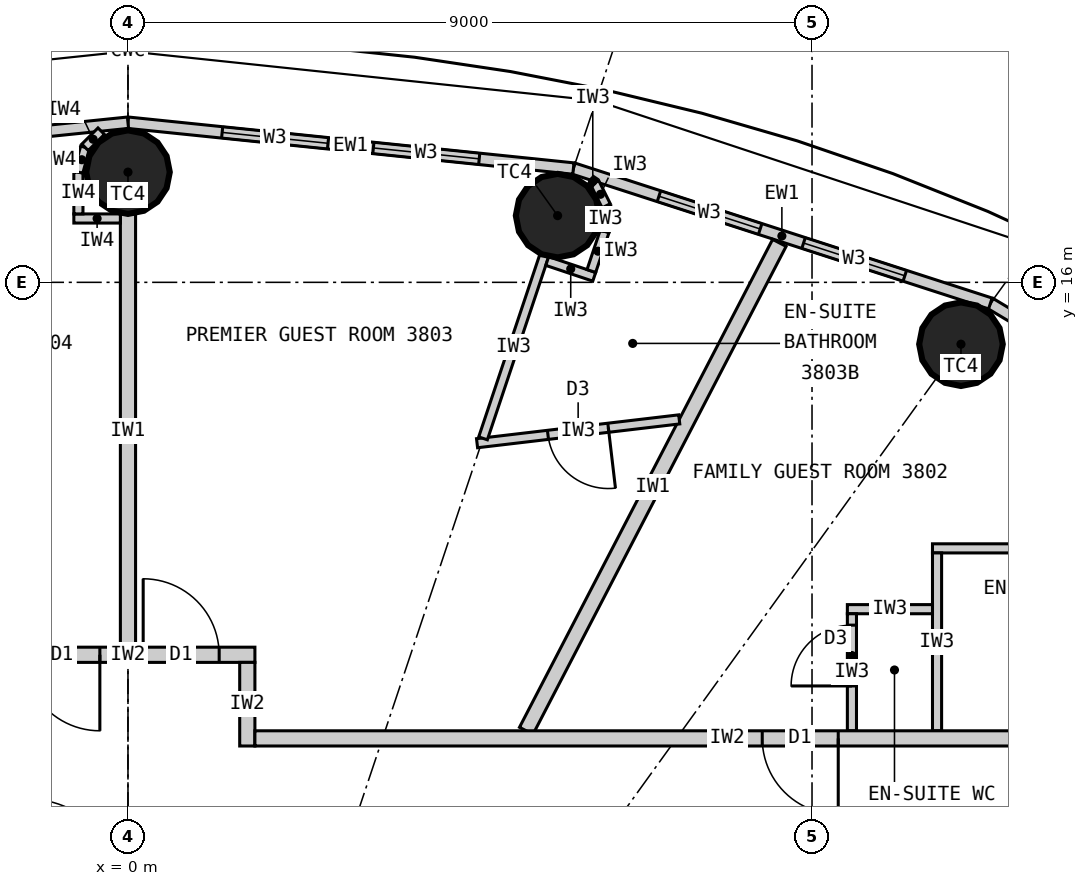
"""IFC4 building model, lengths in metres.
Left out: names, types, materials, properties, quantities, classifications, styles, units other than length and angle.
Written with IfcOpenShell. Run it as: python <this file> out.ifc"""

import sys

from ifc_helpers import new_model, si_unit, direction, frame, frame_2d, origin, origin_2d, place, context, subcontext, project, spatial, rectangle, circle, extrude, element, fill, save


model = new_model("IFC4")
c1 = context("Model", 3, precision=1e-05, world=origin(), true_north=direction((0.0, 1.0)))
c2 = subcontext(c1, "Body", "Model", "MODEL_VIEW")
j1 = project(units=[si_unit("LENGTHUNIT", "METRE"), si_unit("PLANEANGLEUNIT", "RADIAN")], contexts=[c1])
p1 = place(None, origin())
s1 = spatial("IfcSite", under=j1, at=p1, CompositionType="ELEMENT")
p2 = place(p1, origin())
s2 = spatial("IfcBuilding", under=s1, at=p2, CompositionType="ELEMENT")
p3 = place(p2, frame((0.0, 0.0, 146.7)))
s3 = spatial("IfcBuildingStorey", under=s2, at=p3, CompositionType="ELEMENT", Elevation=146.7)
for number, where, z_axis, x_axis in (
    (1, (10.96, 15.186, 0.0), (0.0, 0.0, 1.0), (1.0, 0.0, 0.0)),
    (2, (5.653, 16.877, 0.0), (0.0, 0.0, 1.0), (1.0, 0.0, 0.0)),
    (3, (0.0, 17.45, 0.0), (0.0, 0.0, 1.0), (1.0, 0.0, 0.0)),
):
    element("IfcColumn", number, at=place(p3, frame(where, z_axis=z_axis, x_axis=x_axis)), inside=s3, PredefinedType="COLUMN", context=c2, shape_type="SweptSolid", body=[
        extrude(circle(Radius=0.55, at=origin_2d()), origin(), (0.0, 0.0, 1.0), 3.3),
    ])
p4 = place(p3, frame((16.095, 12.876, 0.0), z_axis=(0.0, 0.0, 1.0), x_axis=(-0.857695199231, 0.514158482587, 0.0)))
e4 = element("IfcWall", 4, at=p4, inside=s3, PredefinedType="ELEMENTEDWALL", context=c2, shape_type="SweptSolid", body=[
    extrude(rectangle(XDim=5.536, YDim=0.15, at=frame_2d((2.768, 0.0))), origin(), (0.0, 0.0, 1.0), 3.12),
])
p5 = place(p4, frame((1.068, 0.0, 0.9)))
e5 = element("IfcOpeningElement", 5, at=p5, cuts=e4, PredefinedType="OPENING", context=c2, shape_type="SweptSolid", body=[
    extrude(rectangle(XDim=1.4, YDim=1.9, at=frame_2d((0.7, 0.95))), frame((0.0, 0.085, 0.0), z_axis=(0.0, -1.0, 0.0), x_axis=(1.0, 0.0, 0.0)), (0.0, 0.0, 1.0), 0.17),
])
p6 = place(p4, frame((3.068, 0.0, 0.9)))
e6 = element("IfcOpeningElement", 6, at=p6, cuts=e4, PredefinedType="OPENING", context=c2, shape_type="SweptSolid", body=[
    extrude(rectangle(XDim=1.4, YDim=1.9, at=frame_2d((0.7, 0.95))), frame((0.0, 0.085, 0.0), z_axis=(0.0, -1.0, 0.0), x_axis=(1.0, 0.0, 0.0)), (0.0, 0.0, 1.0), 0.17),
])
p7 = place(p3, frame((11.346, 15.722, 0.0), z_axis=(0.0, 0.0, 1.0), x_axis=(-0.951432482129, 0.307857486429, 0.0)))
e7 = element("IfcWall", 7, at=p7, inside=s3, PredefinedType="ELEMENTEDWALL", context=c2, shape_type="SweptSolid", body=[
    extrude(rectangle(XDim=5.766, YDim=0.15, at=frame_2d((2.883, 0.0))), origin(), (0.0, 0.0, 1.0), 3.12),
])
p8 = place(p7, frame((1.183, 0.0, 0.9)))
e8 = element("IfcOpeningElement", 8, at=p8, cuts=e7, PredefinedType="OPENING", context=c2, shape_type="SweptSolid", body=[
    extrude(rectangle(XDim=1.4, YDim=1.9, at=frame_2d((0.7, 0.95))), frame((0.0, 0.085, 0.0), z_axis=(0.0, -1.0, 0.0), x_axis=(1.0, 0.0, 0.0)), (0.0, 0.0, 1.0), 0.17),
])
p9 = place(p7, frame((3.183, 0.0, 0.9)))
e9 = element("IfcOpeningElement", 9, at=p9, cuts=e7, PredefinedType="OPENING", context=c2, shape_type="SweptSolid", body=[
    extrude(rectangle(XDim=1.4, YDim=1.9, at=frame_2d((0.7, 0.95))), frame((0.0, 0.085, 0.0), z_axis=(0.0, -1.0, 0.0), x_axis=(1.0, 0.0, 0.0)), (0.0, 0.0, 1.0), 0.17),
])
p10 = place(p3, frame((5.86, 17.497, 0.0), z_axis=(0.0, 0.0, 1.0), x_axis=(-0.994751738032, 0.102318032045, 0.0)))
e10 = element("IfcWall", 10, at=p10, inside=s3, PredefinedType="ELEMENTEDWALL", context=c2, shape_type="SweptSolid", body=[
    extrude(rectangle(XDim=5.891, YDim=0.15, at=frame_2d((2.946, 0.0))), origin(), (0.0, 0.0, 1.0), 3.12),
])
p11 = place(p10, frame((1.246, 0.0, 0.9)))
e11 = element("IfcOpeningElement", 11, at=p11, cuts=e10, PredefinedType="OPENING", context=c2, shape_type="SweptSolid", body=[
    extrude(rectangle(XDim=1.4, YDim=1.9, at=frame_2d((0.7, 0.95))), frame((0.0, 0.085, 0.0), z_axis=(0.0, -1.0, 0.0), x_axis=(1.0, 0.0, 0.0)), (0.0, 0.0, 1.0), 0.17),
])
p12 = place(p10, frame((3.246, 0.0, 0.9)))
e12 = element("IfcOpeningElement", 12, at=p12, cuts=e10, PredefinedType="OPENING", context=c2, shape_type="SweptSolid", body=[
    extrude(rectangle(XDim=1.4, YDim=1.9, at=frame_2d((0.7, 0.95))), frame((0.0, 0.085, 0.0), z_axis=(0.0, -1.0, 0.0), x_axis=(1.0, 0.0, 0.0)), (0.0, 0.0, 1.0), 0.17),
])
p13 = place(p3, frame((0.0, 18.1, 0.0), z_axis=(0.0, 0.0, 1.0), x_axis=(-0.994751738032, -0.102318032045, 0.0)))
e13 = element("IfcWall", 13, at=p13, inside=s3, PredefinedType="ELEMENTEDWALL", context=c2, shape_type="SweptSolid", body=[
    extrude(rectangle(XDim=5.891, YDim=0.15, at=frame_2d((2.946, 0.0))), origin(), (0.0, 0.0, 1.0), 3.12),
])
p14 = place(p13, frame((1.246, 0.0, 0.9)))
e14 = element("IfcOpeningElement", 14, at=p14, cuts=e13, PredefinedType="OPENING", context=c2, shape_type="SweptSolid", body=[
    extrude(rectangle(XDim=1.4, YDim=1.9, at=frame_2d((0.7, 0.95))), frame((0.0, 0.085, 0.0), z_axis=(0.0, -1.0, 0.0), x_axis=(1.0, 0.0, 0.0)), (0.0, 0.0, 1.0), 0.17),
])
p15 = place(p13, frame((3.246, 0.0, 0.9)))
e15 = element("IfcOpeningElement", 15, at=p15, cuts=e13, PredefinedType="OPENING", context=c2, shape_type="SweptSolid", body=[
    extrude(rectangle(XDim=1.4, YDim=1.9, at=frame_2d((0.7, 0.95))), frame((0.0, 0.085, 0.0), z_axis=(0.0, -1.0, 0.0), x_axis=(1.0, 0.0, 0.0)), (0.0, 0.0, 1.0), 0.17),
])
p16 = place(p3, frame((5.24, 10.1, 0.0), z_axis=(0.0, 0.0, 1.0), x_axis=(0.460532965373, 0.887642601391, 0.0)))
e16 = element("IfcWall", 16, at=p16, inside=s3, PredefinedType="PARTITIONING", context=c2, shape_type="SweptSolid", body=[
    extrude(rectangle(XDim=7.231, YDim=0.2, at=frame_2d((3.616, 0.0))), origin(), (0.0, 0.0, 1.0), 3.12),
])
p17 = place(p3, frame((0.0, 11.2, 0.0), z_axis=(0.0, 0.0, 1.0), x_axis=(0.0, 1.0, 0.0)))
e17 = element("IfcWall", 17, at=p17, inside=s3, PredefinedType="PARTITIONING", context=c2, shape_type="SweptSolid", body=[
    extrude(rectangle(XDim=5.7, YDim=0.2, at=frame_2d((2.85, 0.0))), origin(), (0.0, 0.0, 1.0), 2.42),
])
p18 = place(p3, frame((-1.67, 11.1, 0.0), z_axis=(0.0, 0.0, 1.0), x_axis=(1.0, 0.0, 0.0)))
e18 = element("IfcWall", 18, at=p18, inside=s3, PredefinedType="PARTITIONING", context=c2, shape_type="SweptSolid", body=[
    extrude(rectangle(XDim=3.34, YDim=0.2, at=frame_2d((1.67, 0.0))), origin(), (0.0, 0.0, 1.0), 3.12),
])
p19 = place(p18, frame((1.87, 0.0, 0.0)))
e19 = element("IfcOpeningElement", 19, at=p19, cuts=e18, PredefinedType="OPENING", context=c2, shape_type="SweptSolid", body=[
    extrude(rectangle(XDim=1.0, YDim=2.2, at=frame_2d((0.5, 1.1))), frame((0.0, 0.11, 0.0), z_axis=(0.0, -1.0, 0.0), x_axis=(1.0, 0.0, 0.0)), (0.0, 0.0, 1.0), 0.22),
])
p20 = place(p18, frame((0.3, 0.0, 0.0)))
e20 = element("IfcOpeningElement", 20, at=p20, cuts=e18, PredefinedType="OPENING", context=c2, shape_type="SweptSolid", body=[
    extrude(rectangle(XDim=1.0, YDim=2.2, at=frame_2d((0.5, 1.1))), frame((0.0, 0.11, 0.0), z_axis=(0.0, -1.0, 0.0), x_axis=(1.0, 0.0, 0.0)), (0.0, 0.0, 1.0), 0.22),
])
p21 = place(p3, frame((1.57, 9.9, 0.0), z_axis=(0.0, 0.0, 1.0), x_axis=(0.0, 1.0, 0.0)))
e21 = element("IfcWall", 21, at=p21, inside=s3, PredefinedType="PARTITIONING", context=c2, shape_type="SweptSolid", body=[
    extrude(rectangle(XDim=1.1, YDim=0.2, at=frame_2d((0.55, 0.0))), origin(), (0.0, 0.0, 1.0), 3.12),
])
p22 = place(p3, frame((15.525, 12.5, 0.0), z_axis=(0.0, 0.0, 1.0), x_axis=(-1.0, 0.0, 0.0)))
e22 = element("IfcWall", 22, at=p22, inside=s3, PredefinedType="PARTITIONING", context=c2, shape_type="SweptSolid", body=[
    extrude(rectangle(XDim=4.94, YDim=0.12, at=frame_2d((2.47, 0.0))), origin(), (0.0, 0.0, 1.0), 3.12),
])
p23 = place(p22, frame((2.07, 0.0, 0.0)))
e23 = element("IfcOpeningElement", 23, at=p23, cuts=e22, PredefinedType="OPENING", context=c2, shape_type="SweptSolid", body=[
    extrude(rectangle(XDim=0.8, YDim=2.1, at=frame_2d((0.4, 1.05))), frame((0.0, 0.07, 0.0), z_axis=(0.0, -1.0, 0.0), x_axis=(1.0, 0.0, 0.0)), (0.0, 0.0, 1.0), 0.14),
])
p24 = place(p3, frame((10.645, 10.1, 0.0), z_axis=(0.0, 0.0, 1.0), x_axis=(0.0, 1.0, 0.0)))
e24 = element("IfcWall", 24, at=p24, inside=s3, PredefinedType="PARTITIONING", context=c2, shape_type="SweptSolid", body=[
    extrude(rectangle(XDim=2.34, YDim=0.12, at=frame_2d((1.17, 0.0))), origin(), (0.0, 0.0, 1.0), 3.12),
])
p25 = place(p3, frame((10.585, 11.7, 0.0), z_axis=(0.0, 0.0, 1.0), x_axis=(-1.0, 0.0, 0.0)))
e25 = element("IfcWall", 25, at=p25, inside=s3, PredefinedType="PARTITIONING", context=c2, shape_type="SweptSolid", body=[
    extrude(rectangle(XDim=1.12, YDim=0.12, at=frame_2d((0.56, 0.0))), origin(), (0.0, 0.0, 1.0), 3.12),
])
p26 = place(p3, frame((9.525, 10.1, 0.0), z_axis=(0.0, 0.0, 1.0), x_axis=(0.0, 1.0, 0.0)))
e26 = element("IfcWall", 26, at=p26, inside=s3, PredefinedType="PARTITIONING", context=c2, shape_type="SweptSolid", body=[
    extrude(rectangle(XDim=1.54, YDim=0.12, at=frame_2d((0.77, 0.0))), origin(), (0.0, 0.0, 1.0), 3.12),
])
p27 = place(p26, frame((0.59, 0.0, 0.0)))
e27 = element("IfcOpeningElement", 27, at=p27, cuts=e26, PredefinedType="OPENING", context=c2, shape_type="SweptSolid", body=[
    extrude(rectangle(XDim=0.8, YDim=2.1, at=frame_2d((0.4, 1.05))), frame((0.0, 0.07, 0.0), z_axis=(0.0, -1.0, 0.0), x_axis=(1.0, 0.0, 0.0)), (0.0, 0.0, 1.0), 0.14),
])
p28 = place(p3, frame((7.253, 14.197, 0.0), z_axis=(0.0, 0.0, 1.0), x_axis=(-0.993128188393, -0.117031625725, 0.0)))
e28 = element("IfcWall", 28, at=p28, inside=s3, PredefinedType="PARTITIONING", context=c2, shape_type="SweptSolid", body=[
    extrude(rectangle(XDim=2.678, YDim=0.12, at=frame_2d((1.339, 0.0))), origin(), (0.0, 0.0, 1.0), 3.12),
])
p29 = place(p28, frame((0.939, 0.0, 0.0)))
e29 = element("IfcOpeningElement", 29, at=p29, cuts=e28, PredefinedType="OPENING", context=c2, shape_type="SweptSolid", body=[
    extrude(rectangle(XDim=0.8, YDim=2.1, at=frame_2d((0.4, 1.05))), frame((0.0, 0.07, 0.0), z_axis=(0.0, -1.0, 0.0), x_axis=(1.0, 0.0, 0.0)), (0.0, 0.0, 1.0), 0.14),
])
p30 = place(p3, frame((4.671, 13.948, 0.0), z_axis=(0.0, 0.0, 1.0), x_axis=(0.317669167093, 0.948201613729, 0.0)))
e30 = element("IfcWall", 30, at=p30, inside=s3, PredefinedType="PARTITIONING", context=c2, shape_type="SweptSolid", body=[
    extrude(rectangle(XDim=2.54, YDim=0.12, at=frame_2d((1.27, 0.0))), origin(), (0.0, 0.0, 1.0), 2.42),
])
p31 = place(p3, frame((5.516, 16.28, 0.0), z_axis=(0.0, 0.0, 1.0), x_axis=(0.948157944392, -0.317799484717, 0.0)))
e31 = element("IfcWall", 31, at=p31, inside=s3, PredefinedType="PARTITIONING", context=c2, shape_type="SweptSolid", body=[
    extrude(rectangle(XDim=0.652, YDim=0.12, at=frame_2d((0.326, 0.0))), origin(), (0.0, 0.0, 1.0), 3.12),
])
p32 = place(p3, frame((6.097, 16.149, 0.0), z_axis=(0.0, 0.0, 1.0), x_axis=(0.317292604854, 0.948327687514, 0.0)))
e32 = element("IfcWall", 32, at=p32, inside=s3, PredefinedType="PARTITIONING", context=c2, shape_type="SweptSolid", body=[
    extrude(rectangle(XDim=0.55, YDim=0.12, at=frame_2d((0.275, 0.0))), origin(), (0.0, 0.0, 1.0), 3.12),
])
for number, where, z_axis, x_axis in (
    (33, (6.271, 16.67, 0.0), (0.0, 0.0, 1.0), (0.061, 0.998, 0.0)),
    (34, (6.292, 17.007, 0.0), (0.0, 0.0, 1.0), (-0.445, 0.895, 0.0)),
):
    element("IfcWall", number, at=place(p3, frame(where, z_axis=z_axis, x_axis=x_axis)), inside=s3, PredefinedType="PARTITIONING", context=c2, shape_type="SweptSolid", body=[
        extrude(rectangle(XDim=0.338, YDim=0.12, at=frame_2d((0.169, 0.0))), origin(), (0.0, 0.0, 1.0), 3.12),
    ])
p33 = place(p3, frame((6.142, 17.31, 0.0), z_axis=(0.0, 0.0, 1.0), x_axis=(-0.835039693181, 0.550189704386, 0.0)))
e35 = element("IfcWall", 35, at=p33, inside=s3, PredefinedType="PARTITIONING", context=c2, shape_type="SweptSolid", body=[
    extrude(rectangle(XDim=0.062, YDim=0.12, at=frame_2d((0.031, 0.0))), origin(), (0.0, 0.0, 1.0), 3.12),
])
p34 = place(p3, frame((1.67, 10.0, 0.0), z_axis=(0.0, 0.0, 1.0), x_axis=(1.0, 0.0, 0.0)))
e36 = element("IfcWall", 36, at=p34, inside=s3, PredefinedType="PARTITIONING", context=c2, shape_type="SweptSolid", body=[
    extrude(rectangle(XDim=12.43, YDim=0.2, at=frame_2d((6.215, 0.0))), origin(), (0.0, 0.0, 1.0), 3.12),
])
p35 = place(p34, frame((6.675, 0.0, 0.0)))
e37 = element("IfcOpeningElement", 37, at=p35, cuts=e36, PredefinedType="OPENING", context=c2, shape_type="SweptSolid", body=[
    extrude(rectangle(XDim=1.0, YDim=2.2, at=frame_2d((0.5, 1.1))), frame((0.0, 0.11, 0.0), z_axis=(0.0, -1.0, 0.0), x_axis=(1.0, 0.0, 0.0)), (0.0, 0.0, 1.0), 0.22),
])
p36 = place(p3, frame((-0.1, 16.84, 0.0), z_axis=(0.0, 0.0, 1.0), x_axis=(-1.0, 0.0, 0.0)))
e38 = element("IfcWall", 38, at=p36, inside=s3, PredefinedType="PARTITIONING", context=c2, shape_type="SweptSolid", body=[
    extrude(rectangle(XDim=0.612, YDim=0.12, at=frame_2d((0.306, 0.0))), origin(), (0.0, 0.0, 1.0), 3.12),
])
p37 = place(p3, frame((-0.652, 16.9, 0.0), z_axis=(0.0, 0.0, 1.0), x_axis=(0.0, 1.0, 0.0)))
e39 = element("IfcWall", 39, at=p37, inside=s3, PredefinedType="PARTITIONING", context=c2, shape_type="SweptSolid", body=[
    extrude(rectangle(XDim=0.55, YDim=0.12, at=frame_2d((0.275, 0.0))), origin(), (0.0, 0.0, 1.0), 3.12),
])
p38 = place(p3, frame((-0.652, 17.45, 0.0), z_axis=(0.0, 0.0, 1.0), x_axis=(0.258832454679, 0.965922233104, 0.0)))
e40 = element("IfcWall", 40, at=p38, inside=s3, PredefinedType="PARTITIONING", context=c2, shape_type="SweptSolid", body=[
    extrude(rectangle(XDim=0.338, YDim=0.12, at=frame_2d((0.169, 0.0))), origin(), (0.0, 0.0, 1.0), 3.12),
])
p39 = place(p3, frame((-0.565, 17.776, 0.0), z_axis=(0.0, 0.0, 1.0), x_axis=(0.707106781187, 0.707106781187, 0.0)))
e41 = element("IfcWall", 41, at=p39, inside=s3, PredefinedType="PARTITIONING", context=c2, shape_type="SweptSolid", body=[
    extrude(rectangle(XDim=0.301, YDim=0.12, at=frame_2d((0.15, 0.0))), origin(), (0.0, 0.0, 1.0), 3.12),
])
p40 = place(p8, origin())
e42 = element("IfcWindow", 42, at=p40, inside=s3, PartitioningType="SINGLE_PANEL", PredefinedType="WINDOW", context=c2, shape_type="SweptSolid", body=[
    extrude(rectangle(XDim=1.4, YDim=1.9, at=frame_2d((0.7, 0.95))), frame((0.0, 0.03, 0.0), z_axis=(0.0, -1.0, 0.0), x_axis=(1.0, 0.0, 0.0)), (0.0, 0.0, 1.0), 0.06),
])
fill(e8, e42)
p41 = place(p9, origin())
e43 = element("IfcWindow", 43, at=p41, inside=s3, PartitioningType="SINGLE_PANEL", PredefinedType="WINDOW", context=c2, shape_type="SweptSolid", body=[
    extrude(rectangle(XDim=1.4, YDim=1.9, at=frame_2d((0.7, 0.95))), frame((0.0, 0.03, 0.0), z_axis=(0.0, -1.0, 0.0), x_axis=(1.0, 0.0, 0.0)), (0.0, 0.0, 1.0), 0.06),
])
fill(e9, e43)
p42 = place(p11, origin())
e44 = element("IfcWindow", 44, at=p42, inside=s3, PartitioningType="SINGLE_PANEL", PredefinedType="WINDOW", context=c2, shape_type="SweptSolid", body=[
    extrude(rectangle(XDim=1.4, YDim=1.9, at=frame_2d((0.7, 0.95))), frame((0.0, 0.03, 0.0), z_axis=(0.0, -1.0, 0.0), x_axis=(1.0, 0.0, 0.0)), (0.0, 0.0, 1.0), 0.06),
])
fill(e11, e44)
p43 = place(p12, origin())
e45 = element("IfcWindow", 45, at=p43, inside=s3, PartitioningType="SINGLE_PANEL", PredefinedType="WINDOW", context=c2, shape_type="SweptSolid", body=[
    extrude(rectangle(XDim=1.4, YDim=1.9, at=frame_2d((0.7, 0.95))), frame((0.0, 0.03, 0.0), z_axis=(0.0, -1.0, 0.0), x_axis=(1.0, 0.0, 0.0)), (0.0, 0.0, 1.0), 0.06),
])
fill(e12, e45)
p44 = place(p27, origin())
e46 = element("IfcDoor", 46, at=p44, inside=s3, OperationType="SINGLE_SWING_LEFT", PredefinedType="DOOR", context=c2, shape_type="SweptSolid", body=[
    extrude(rectangle(XDim=0.8, YDim=2.1, at=frame_2d((0.4, 1.05))), frame((0.0, 0.025, 0.0), z_axis=(0.0, -1.0, 0.0), x_axis=(1.0, 0.0, 0.0)), (0.0, 0.0, 1.0), 0.05),
])
fill(e27, e46)
p45 = place(p35, origin())
e47 = element("IfcDoor", 47, at=p45, inside=s3, OperationType="SINGLE_SWING_RIGHT", PredefinedType="DOOR", context=c2, shape_type="SweptSolid", body=[
    extrude(rectangle(XDim=1.0, YDim=2.2, at=frame_2d((0.5, 1.1))), frame((0.0, 0.025, 0.0), z_axis=(0.0, -1.0, 0.0), x_axis=(1.0, 0.0, 0.0)), (0.0, 0.0, 1.0), 0.05),
])
fill(e37, e47)
p46 = place(p29, origin())
e48 = element("IfcDoor", 48, at=p46, inside=s3, OperationType="SINGLE_SWING_LEFT", PredefinedType="DOOR", context=c2, shape_type="SweptSolid", body=[
    extrude(rectangle(XDim=0.8, YDim=2.1, at=frame_2d((0.4, 1.05))), frame((0.0, 0.025, 0.0), z_axis=(0.0, -1.0, 0.0), x_axis=(1.0, 0.0, 0.0)), (0.0, 0.0, 1.0), 0.05),
])
fill(e29, e48)
p47 = place(p19, origin())
e49 = element("IfcDoor", 49, at=p47, inside=s3, OperationType="SINGLE_SWING_LEFT", PredefinedType="DOOR", context=c2, shape_type="SweptSolid", body=[
    extrude(rectangle(XDim=1.0, YDim=2.2, at=frame_2d((0.5, 1.1))), frame((0.0, 0.025, 0.0), z_axis=(0.0, -1.0, 0.0), x_axis=(1.0, 0.0, 0.0)), (0.0, 0.0, 1.0), 0.05),
])
fill(e19, e49)
p48 = place(p20, origin())
e50 = element("IfcDoor", 50, at=p48, inside=s3, OperationType="SINGLE_SWING_RIGHT", PredefinedType="DOOR", context=c2, shape_type="SweptSolid", body=[
    extrude(rectangle(XDim=1.0, YDim=2.2, at=frame_2d((0.5, 1.1))), frame((0.0, 0.025, 0.0), z_axis=(0.0, -1.0, 0.0), x_axis=(1.0, 0.0, 0.0)), (0.0, 0.0, 1.0), 0.05),
])
fill(e20, e50)
save(model, sys.argv[1])
